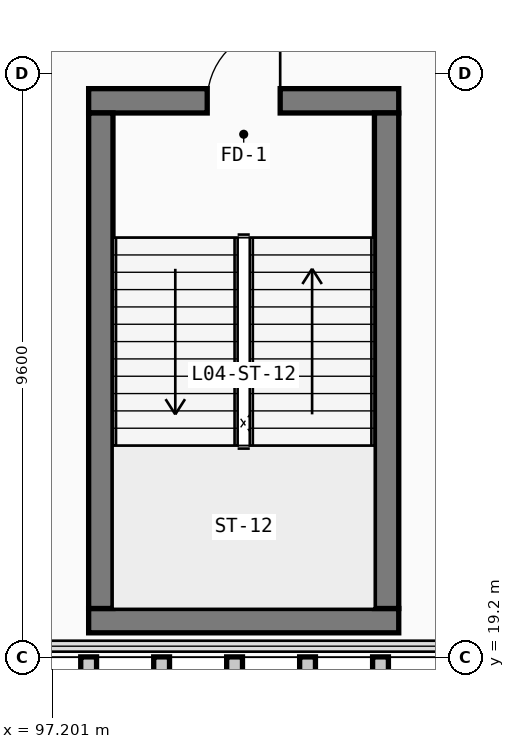
"""IFC4 building model, lengths in metres.
Left out: names, types, materials, properties, quantities, classifications, styles, units other than length and angle.
Written with IfcOpenShell. Run it as: python <this file> out.ifc"""

import sys

from ifc_helpers import new_model, si_unit, direction, frame, frame_2d, origin, place, context, subcontext, project, spatial, rectangle, extrude, element, fill, save


model = new_model("IFC4")
c1 = context("Model", 3, precision=1e-05, world=origin(), true_north=direction((0.0, 1.0)))
c2 = subcontext(c1, "Body", "Model", "MODEL_VIEW")
j1 = project(units=[si_unit("LENGTHUNIT", "METRE"), si_unit("PLANEANGLEUNIT", "RADIAN")], contexts=[c1])
p1 = place(None, origin())
s1 = spatial("IfcSite", under=j1, at=p1, CompositionType="ELEMENT")
p2 = place(p1, origin())
s2 = spatial("IfcBuilding", under=s1, at=p2, CompositionType="ELEMENT")
p3 = place(p2, frame((0.0, 0.0, 18.6)))
s3 = spatial("IfcBuildingStorey", under=s2, at=p3, CompositionType="ELEMENT", Elevation=18.6)
p4 = place(p3, frame((97.8, 19.8, 0.0), z_axis=(0.0, 0.0, 1.0), x_axis=(1.0, 0.0, 0.0)))
e1 = element("IfcWall", 1, at=p4, inside=s3, PredefinedType="SHEAR", context=c2, shape_type="SweptSolid", body=[
    extrude(rectangle(XDim=5.1, YDim=0.4, at=frame_2d((2.55, 0.0))), origin(), (0.0, 0.0, 1.0), 4.24),
])
p5 = place(p3, frame((102.9, 28.35, 0.0), z_axis=(0.0, 0.0, 1.0), x_axis=(-1.0, 0.0, 0.0)))
e2 = element("IfcWall", 2, at=p5, inside=s3, PredefinedType="SHEAR", context=c2, shape_type="SweptSolid", body=[
    extrude(rectangle(XDim=5.1, YDim=0.4, at=frame_2d((2.55, 0.0))), origin(), (0.0, 0.0, 1.0), 4.24),
])
p6 = place(p5, frame((3.15, 0.0, 0.0), z_axis=(0.0, 0.0, 1.0), x_axis=(-1.0, 0.0, 0.0)))
e3 = element("IfcOpeningElement", 3, at=p6, cuts=e2, PredefinedType="OPENING", context=c2, shape_type="SweptSolid", body=[
    extrude(rectangle(XDim=1.2, YDim=2.2, at=frame_2d((0.6, 1.1))), frame((0.0, 0.21, 0.0), z_axis=(0.0, -1.0, 0.0), x_axis=(1.0, 0.0, 0.0)), (0.0, 0.0, 1.0), 0.42),
])
for number, where, z_axis, x_axis in (
    (4, (98.0, 28.15, 0.0), (0.0, 0.0, 1.0), (0.0, -1.0, 0.0)),
    (5, (102.7, 20.0, 0.0), (0.0, 0.0, 1.0), (0.0, 1.0, 0.0)),
):
    element("IfcWall", number, at=place(p3, frame(where, z_axis=z_axis, x_axis=x_axis)), inside=s3, PredefinedType="SHEAR", context=c2, shape_type="SweptSolid", body=[
        extrude(rectangle(XDim=8.15, YDim=0.4, at=frame_2d((4.075, 0.0))), origin(), (0.0, 0.0, 1.0), 4.24),
    ])
p7 = place(p6, origin())
e6 = element("IfcDoor", 6, at=p7, inside=s3, OperationType="SINGLE_SWING_RIGHT", PredefinedType="DOOR", context=c2, shape_type="SweptSolid", body=[
    extrude(rectangle(XDim=1.2, YDim=2.2, at=frame_2d((0.6, 1.1))), frame((0.0, 0.025, 0.0), z_axis=(0.0, -1.0, 0.0), x_axis=(1.0, 0.0, 0.0)), (0.0, 0.0, 1.0), 0.05),
])
fill(e3, e6)
save(model, sys.argv[1])
